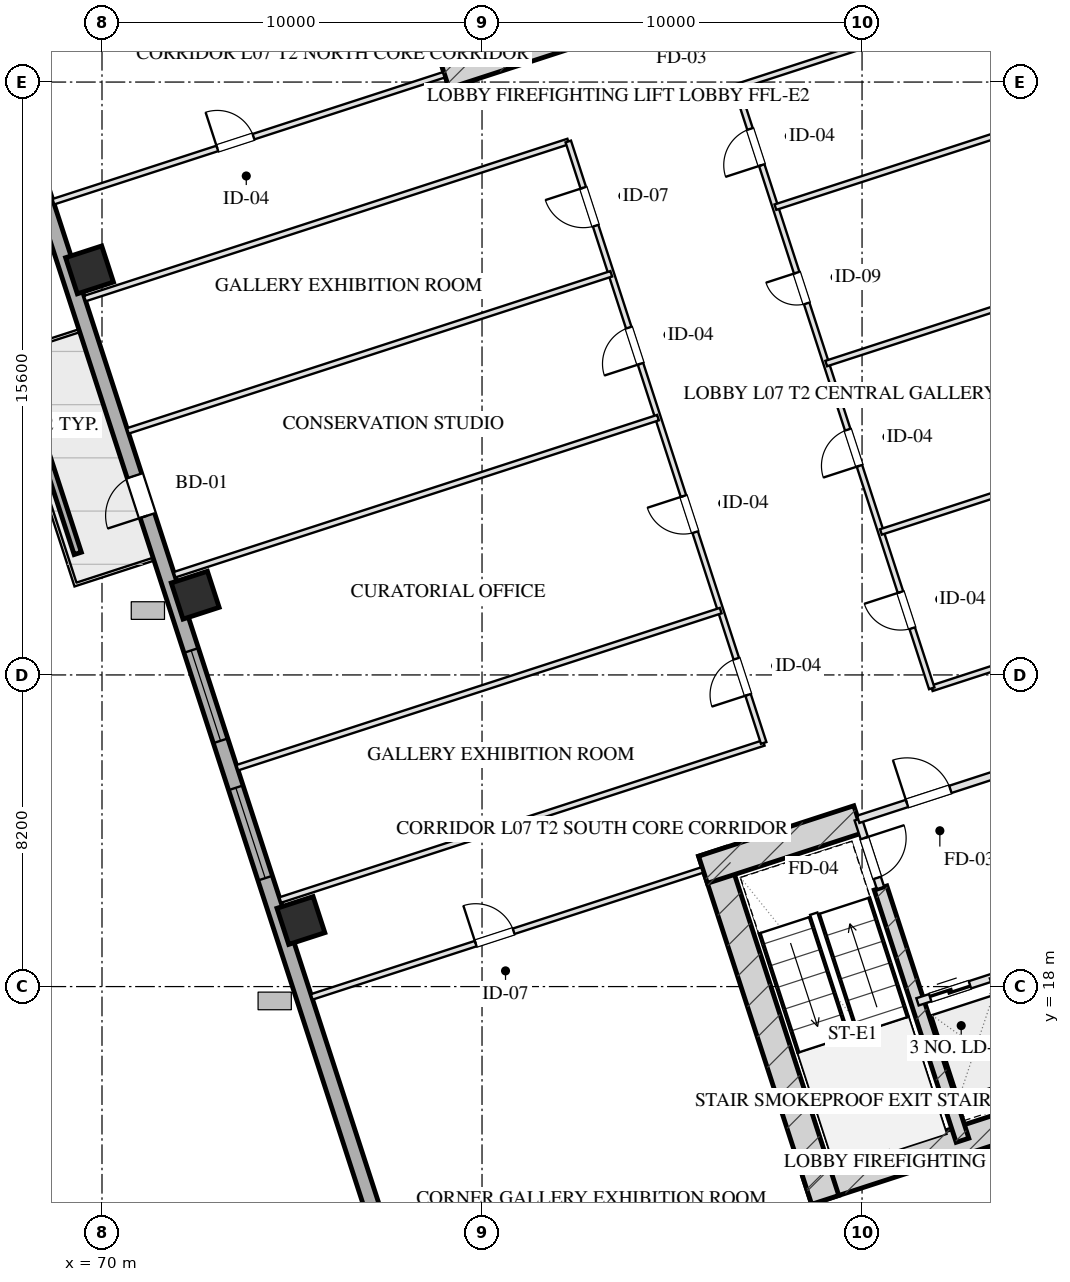
"""IFC4 building model, lengths in metres.
Left out: names, types, materials, properties, quantities, classifications, styles, units other than length and angle.
Written with IfcOpenShell. Run it as: python <this file> out.ifc"""

import sys

from ifc_helpers import new_model, si_unit, direction, frame, frame_2d, origin, origin_2d, place, context, subcontext, project, spatial, rectangle, hollow_rectangle, extrude, element, fill, save


model = new_model("IFC4")
c1 = context("Model", 3, precision=1e-05, world=origin(), true_north=direction((0.0, 1.0)))
c2 = subcontext(c1, "Body", "Model", "MODEL_VIEW")
j1 = project(units=[si_unit("LENGTHUNIT", "METRE"), si_unit("PLANEANGLEUNIT", "RADIAN")], contexts=[c1])
p1 = place(None, origin())
s1 = spatial("IfcSite", under=j1, at=p1, CompositionType="ELEMENT")
p2 = place(p1, origin())
s2 = spatial("IfcBuilding", under=s1, at=p2, CompositionType="ELEMENT")
p3 = place(p2, frame((0.0, 0.0, 34.0)))
s3 = spatial("IfcBuildingStorey", under=s2, at=p3, CompositionType="ELEMENT", Elevation=34.0)
p4 = place(p3, frame((88.559, 12.629, 0.0), z_axis=(0.0, 0.0, 1.0), x_axis=(0.951056072937, 0.309018358888, 0.0)))
e1 = element("IfcWall", 1, at=p4, inside=s3, PredefinedType="SHEAR", context=c2, shape_type="SweptSolid", body=[
    extrude(rectangle(XDim=16.55, YDim=0.75, at=frame_2d((8.275, 0.0))), origin(), (0.0, 0.0, 1.0), 4.0),
])
p5 = place(p3, frame((86.055, 21.546, 0.0), z_axis=(0.0, 0.0, 1.0), x_axis=(0.309023585745, -0.951054374604, 0.0)))
e2 = element("IfcWall", 2, at=p5, inside=s3, PredefinedType="SHEAR", context=c2, shape_type="SweptSolid", body=[
    extrude(rectangle(XDim=9.63, YDim=0.75, at=frame_2d((4.815, 0.0))), origin(), (0.0, 0.0, 1.0), 4.0),
])
p6 = place(p3, frame((90.486, 20.594, 0.0), z_axis=(0.0, 0.0, 1.0), x_axis=(0.309020428229, -0.951055400562, 0.0)))
e3 = element("IfcWall", 3, at=p6, inside=s3, PredefinedType="SHEAR", context=c2, shape_type="SweptSolid", body=[
    extrude(rectangle(XDim=6.98, YDim=0.35, at=frame_2d((3.49, 0.0))), origin(), (0.0, 0.0, 1.0), 4.0),
])
p7 = place(p3, frame((85.814, 21.074, 0.0), z_axis=(0.0, 0.0, 1.0), x_axis=(0.95106580992, 0.308988390074, 0.0)))
e4 = element("IfcWall", 4, at=p7, inside=s3, PredefinedType="SHEAR", context=c2, shape_type="SweptSolid", body=[
    extrude(rectangle(XDim=4.295, YDim=0.75, at=frame_2d((2.147, 0.0))), origin(), (0.0, 0.0, 1.0), 4.0),
])
p8 = place(p3, frame((79.489, 41.756, 0.0), z_axis=(0.0, 0.0, 1.0), x_axis=(-0.309016134813, 0.951056795583, 0.0)))
e5 = element("IfcWall", 5, at=p8, inside=s3, PredefinedType="SHEAR", context=c2, shape_type="SweptSolid", body=[
    extrude(rectangle(XDim=9.63, YDim=0.75, at=frame_2d((4.815, 0.0))), origin(), (0.0, 0.0, 1.0), 4.0),
])
p9 = place(p3, frame((79.016, 41.997, 0.0), z_axis=(0.0, 0.0, 1.0), x_axis=(0.95106038264, 0.309005094736, 0.0)))
e6 = element("IfcWall", 6, at=p9, inside=s3, PredefinedType="SHEAR", context=c2, shape_type="SweptSolid", body=[
    extrude(rectangle(XDim=4.295, YDim=0.75, at=frame_2d((2.147, 0.0))), origin(), (0.0, 0.0, 1.0), 4.0),
])
for number, where, z_axis, x_axis in (
    (7, (75.234, 19.739, 0.0), (0.0, 0.0, 1.0), (0.951, 0.309, 0.0)),
    (8, (72.453, 28.299, 0.0), (0.0, 0.0, 1.0), (0.951, 0.309, 0.0)),
    (9, (69.672, 36.858, 0.0), (0.0, 0.0, 1.0), (0.951, 0.309, 0.0)),
):
    element("IfcColumn", number, at=place(p3, frame(where, z_axis=z_axis, x_axis=x_axis)), inside=s3, PredefinedType="COLUMN", context=c2, shape_type="SweptSolid", body=[
        extrude(hollow_rectangle(XDim=1.0, YDim=1.0, WallThickness=0.036, at=origin_2d()), origin(), (0.0, 0.0, 1.0), 4.001),
    ])
p10 = place(p3, frame((79.655, 4.352, 0.0), z_axis=(0.0, 0.0, 1.0), x_axis=(-0.309014526607, 0.951057318118, 0.0)))
e10 = element("IfcWall", 10, at=p10, inside=s3, PredefinedType="SOLIDWALL", context=c2, shape_type="SweptSolid", body=[
    extrude(rectangle(XDim=50.0, YDim=0.4, at=frame_2d((25.0, 0.0))), origin(), (0.0, 0.0, 1.0), 3.16),
])
p11 = place(p10, frame((17.35, 0.0, 0.75)))
e11 = element("IfcOpeningElement", 11, at=p11, cuts=e10, PredefinedType="OPENING", context=c2, shape_type="SweptSolid", body=[
    extrude(rectangle(XDim=2.5, YDim=1.75, at=frame_2d((1.25, 0.875))), frame((0.0, 0.21, 0.0), z_axis=(0.0, -1.0, 0.0), x_axis=(1.0, 0.0, 0.0)), (0.0, 0.0, 1.0), 0.42),
])
p12 = place(p10, frame((21.15, 0.0, 0.75)))
e12 = element("IfcOpeningElement", 12, at=p12, cuts=e10, PredefinedType="OPENING", context=c2, shape_type="SweptSolid", body=[
    extrude(rectangle(XDim=2.5, YDim=1.75, at=frame_2d((1.25, 0.875))), frame((0.0, 0.21, 0.0), z_axis=(0.0, -1.0, 0.0), x_axis=(1.0, 0.0, 0.0)), (0.0, 0.0, 1.0), 0.42),
])
p13 = place(p10, frame((27.38, 0.0, 0.0)))
e13 = element("IfcOpeningElement", 13, at=p13, cuts=e10, PredefinedType="OPENING", context=c2, shape_type="SweptSolid", body=[
    extrude(rectangle(XDim=1.1, YDim=2.15, at=frame_2d((0.55, 1.075))), frame((0.0, 0.21, 0.0), z_axis=(0.0, -1.0, 0.0), x_axis=(1.0, 0.0, 0.0)), (0.0, 0.0, 1.0), 0.42),
])
p14 = place(p3, frame((113.998, 12.567, 0.0), z_axis=(0.0, 0.0, 1.0), x_axis=(-0.951055939317, -0.309018770125, 0.0)))
e14 = element("IfcWall", 14, at=p14, inside=s3, PredefinedType="SOLIDWALL", context=c2, shape_type="SweptSolid", body=[
    extrude(rectangle(XDim=32.4, YDim=0.4, at=frame_2d((16.2, 0.0))), origin(), (0.0, 0.0, 1.0), 3.16),
])
p15 = place(p3, frame((69.362, 29.397, 0.0), z_axis=(0.0, 0.0, 1.0), x_axis=(-0.309032019345, 0.951051634255, 0.0)))
e15 = element("IfcWall", 15, at=p15, inside=s3, PredefinedType="PARAPET", context=c2, shape_type="SweptSolid", body=[
    extrude(rectangle(XDim=4.8, YDim=0.2, at=frame_2d((2.4, 0.0))), origin(), (0.0, 0.0, 1.0), 0.75),
])
p16 = place(p3, frame((89.899, 22.401, 0.0), z_axis=(0.0, 0.0, 1.0), x_axis=(0.308932062672, -0.951084108086, 0.0)))
e16 = element("IfcWall", 16, at=p16, inside=s3, PredefinedType="PARTITIONING", context=c2, shape_type="SweptSolid", body=[
    extrude(rectangle(XDim=1.9, YDim=0.2, at=frame_2d((0.95, 0.0))), origin(), (0.0, 0.0, 1.0), 3.725),
])
p17 = place(p16, frame((0.52, 0.0, 0.0)))
e17 = element("IfcOpeningElement", 17, at=p17, cuts=e16, PredefinedType="OPENING", context=c2, shape_type="SweptSolid", body=[
    extrude(rectangle(XDim=1.1, YDim=2.05, at=frame_2d((0.55, 1.025))), frame((0.0, 0.11, 0.0), z_axis=(0.0, -1.0, 0.0), x_axis=(1.0, 0.0, 0.0)), (0.0, 0.0, 1.0), 0.22),
])
p18 = place(p3, frame((89.899, 22.401, 0.0), z_axis=(0.0, 0.0, 1.0), x_axis=(0.951046716504, 0.309047153403, 0.0)))
e18 = element("IfcWall", 18, at=p18, inside=s3, PredefinedType="PARTITIONING", context=c2, shape_type="SweptSolid", body=[
    extrude(rectangle(XDim=3.83, YDim=0.2, at=frame_2d((1.915, 0.0))), origin(), (0.0, 0.0, 1.0), 3.725),
])
p19 = place(p18, frame((1.35, 0.0, 0.0)))
e19 = element("IfcOpeningElement", 19, at=p19, cuts=e18, PredefinedType="OPENING", context=c2, shape_type="SweptSolid", body=[
    extrude(rectangle(XDim=1.2, YDim=2.05, at=frame_2d((0.6, 1.025))), frame((0.0, 0.11, 0.0), z_axis=(0.0, -1.0, 0.0), x_axis=(1.0, 0.0, 0.0)), (0.0, 0.0, 1.0), 0.22),
])
p20 = place(p3, frame((91.46, 17.598, 0.0), z_axis=(0.0, 0.0, 1.0), x_axis=(0.951062257173, 0.308999325213, 0.0)))
e20 = element("IfcWall", 20, at=p20, inside=s3, PredefinedType="PARTITIONING", context=c2, shape_type="SweptSolid", body=[
    extrude(rectangle(XDim=2.1, YDim=0.2, at=frame_2d((1.05, 0.0))), origin(), (0.0, 0.0, 1.0), 3.725),
])
p21 = place(p20, frame((0.35, 0.0, 0.0)))
e21 = element("IfcOpeningElement", 21, at=p21, cuts=e20, PredefinedType="OPENING", context=c2, shape_type="SweptSolid", body=[
    extrude(rectangle(XDim=1.1, YDim=2.05, at=frame_2d((0.55, 1.025))), frame((0.0, 0.11, 0.0), z_axis=(0.0, -1.0, 0.0), x_axis=(1.0, 0.0, 0.0)), (0.0, 0.0, 1.0), 0.22),
])
p22 = place(p3, frame((93.457, 18.247, 0.0), z_axis=(0.0, 0.0, 1.0), x_axis=(0.3089935693, -0.951064127245, 0.0)))
e22 = element("IfcWall", 22, at=p22, inside=s3, PredefinedType="PARTITIONING", context=c2, shape_type="SweptSolid", body=[
    extrude(rectangle(XDim=3.7, YDim=0.2, at=frame_2d((1.85, 0.0))), origin(), (0.0, 0.0, 1.0), 3.725),
])
p23 = place(p3, frame((75.519, 17.729, 0.0), z_axis=(0.0, 0.0, 1.0), x_axis=(0.951056658866, 0.309016555588, 0.0)))
e23 = element("IfcWall", 23, at=p23, inside=s3, PredefinedType="PARTITIONING", context=c2, shape_type="SweptSolid", body=[
    extrude(rectangle(XDim=10.8, YDim=0.15, at=frame_2d((5.4, 0.0))), origin(), (0.0, 0.0, 1.0), 3.725),
])
p24 = place(p23, frame((4.536, 0.0, 0.0)))
e24 = element("IfcOpeningElement", 24, at=p24, cuts=e23, PredefinedType="OPENING", context=c2, shape_type="SweptSolid", body=[
    extrude(rectangle(XDim=1.05, YDim=2.05, at=frame_2d((0.525, 1.025))), frame((0.0, 0.085, 0.0), z_axis=(0.0, -1.0, 0.0), x_axis=(1.0, 0.0, 0.0)), (0.0, 0.0, 1.0), 0.17),
])
p25 = place(p3, frame((68.721, 38.652, 0.0), z_axis=(0.0, 0.0, 1.0), x_axis=(0.951056658866, 0.309016555588, 0.0)))
e25 = element("IfcWall", 25, at=p25, inside=s3, PredefinedType="PARTITIONING", context=c2, shape_type="SweptSolid", body=[
    extrude(rectangle(XDim=10.8, YDim=0.15, at=frame_2d((5.4, 0.0))), origin(), (0.0, 0.0, 1.0), 3.725),
])
p26 = place(p25, frame((4.536, 0.0, 0.0)))
e26 = element("IfcOpeningElement", 26, at=p26, cuts=e25, PredefinedType="OPENING", context=c2, shape_type="SweptSolid", body=[
    extrude(rectangle(XDim=1.0, YDim=2.05, at=frame_2d((0.5, 1.025))), frame((0.0, 0.085, 0.0), z_axis=(0.0, -1.0, 0.0), x_axis=(1.0, 0.0, 0.0)), (0.0, 0.0, 1.0), 0.17),
])
p27 = place(p3, frame((74.691, 20.278, 0.0), z_axis=(0.0, 0.0, 1.0), x_axis=(0.951052712421, 0.309028701251, 0.0)))
e27 = element("IfcWall", 27, at=p27, inside=s3, PredefinedType="PARTITIONING", context=c2, shape_type="SweptSolid", body=[
    extrude(rectangle(XDim=13.375, YDim=0.15, at=frame_2d((6.688, 0.0))), origin(), (0.0, 0.0, 1.0), 3.725),
])
p28 = place(p3, frame((91.834, 25.848, 0.0), z_axis=(0.0, 0.0, 1.0), x_axis=(0.951055605195, 0.309019798438, 0.0)))
e28 = element("IfcWall", 28, at=p28, inside=s3, PredefinedType="PARTITIONING", context=c2, shape_type="SweptSolid", body=[
    extrude(rectangle(XDim=19.575, YDim=0.15, at=frame_2d((9.788, 0.0))), origin(), (0.0, 0.0, 1.0), 3.725),
])
p29 = place(p3, frame((69.549, 36.103, 0.0), z_axis=(0.0, 0.0, 1.0), x_axis=(0.951058077006, 0.309012190961, 0.0)))
e29 = element("IfcWall", 29, at=p29, inside=s3, PredefinedType="PARTITIONING", context=c2, shape_type="SweptSolid", body=[
    extrude(rectangle(XDim=13.375, YDim=0.15, at=frame_2d((6.688, 0.0))), origin(), (0.0, 0.0, 1.0), 3.725),
])
p30 = place(p3, frame((86.692, 41.673, 0.0), z_axis=(0.0, 0.0, 1.0), x_axis=(0.951055605195, 0.309019798438, 0.0)))
e30 = element("IfcWall", 30, at=p30, inside=s3, PredefinedType="PARTITIONING", context=c2, shape_type="SweptSolid", body=[
    extrude(rectangle(XDim=19.575, YDim=0.15, at=frame_2d((9.788, 0.0))), origin(), (0.0, 0.0, 1.0), 3.725),
])
p31 = place(p3, frame((87.412, 24.411, 0.0), z_axis=(0.0, 0.0, 1.0), x_axis=(-0.309022042254, 0.951054876125, 0.0)))
e31 = element("IfcWall", 31, at=p31, inside=s3, PredefinedType="PARTITIONING", context=c2, shape_type="SweptSolid", body=[
    extrude(rectangle(XDim=16.64, YDim=0.15, at=frame_2d((8.32, 0.0))), origin(), (0.0, 0.0, 1.0), 3.725),
])
p32 = place(p31, frame((1.33, 0.0, 0.0)))
e32 = element("IfcOpeningElement", 32, at=p32, cuts=e31, PredefinedType="OPENING", context=c2, shape_type="SweptSolid", body=[
    extrude(rectangle(XDim=1.0, YDim=2.05, at=frame_2d((0.5, 1.025))), frame((0.0, 0.085, 0.0), z_axis=(0.0, -1.0, 0.0), x_axis=(1.0, 0.0, 0.0)), (0.0, 0.0, 1.0), 0.17),
])
p33 = place(p31, frame((5.83, 0.0, 0.0)))
e33 = element("IfcOpeningElement", 33, at=p33, cuts=e31, PredefinedType="OPENING", context=c2, shape_type="SweptSolid", body=[
    extrude(rectangle(XDim=1.0, YDim=2.05, at=frame_2d((0.5, 1.025))), frame((0.0, 0.085, 0.0), z_axis=(0.0, -1.0, 0.0), x_axis=(1.0, 0.0, 0.0)), (0.0, 0.0, 1.0), 0.17),
])
p34 = place(p31, frame((10.49, 0.0, 0.0)))
e34 = element("IfcOpeningElement", 34, at=p34, cuts=e31, PredefinedType="OPENING", context=c2, shape_type="SweptSolid", body=[
    extrude(rectangle(XDim=1.0, YDim=2.05, at=frame_2d((0.5, 1.025))), frame((0.0, 0.085, 0.0), z_axis=(0.0, -1.0, 0.0), x_axis=(1.0, 0.0, 0.0)), (0.0, 0.0, 1.0), 0.17),
])
p35 = place(p31, frame((14.31, 0.0, 0.0)))
e35 = element("IfcOpeningElement", 35, at=p35, cuts=e31, PredefinedType="OPENING", context=c2, shape_type="SweptSolid", body=[
    extrude(rectangle(XDim=1.05, YDim=2.05, at=frame_2d((0.525, 1.025))), frame((0.0, 0.085, 0.0), z_axis=(0.0, -1.0, 0.0), x_axis=(1.0, 0.0, 0.0)), (0.0, 0.0, 1.0), 0.17),
])
p36 = place(p3, frame((91.834, 25.848, 0.0), z_axis=(0.0, 0.0, 1.0), x_axis=(-0.30901773025, 0.951056277195, 0.0)))
e36 = element("IfcWall", 36, at=p36, inside=s3, PredefinedType="PARTITIONING", context=c2, shape_type="SweptSolid", body=[
    extrude(rectangle(XDim=16.64, YDim=0.15, at=frame_2d((8.32, 0.0))), origin(), (0.0, 0.0, 1.0), 3.725),
])
p37 = place(p36, frame((1.663, 0.0, 0.0)))
e37 = element("IfcOpeningElement", 37, at=p37, cuts=e36, PredefinedType="OPENING", context=c2, shape_type="SweptSolid", body=[
    extrude(rectangle(XDim=1.0, YDim=2.05, at=frame_2d((0.5, 1.025))), frame((0.0, 0.085, 0.0), z_axis=(0.0, -1.0, 0.0), x_axis=(1.0, 0.0, 0.0)), (0.0, 0.0, 1.0), 0.17),
])
p38 = place(p36, frame((6.156, 0.0, 0.0)))
e38 = element("IfcOpeningElement", 38, at=p38, cuts=e36, PredefinedType="OPENING", context=c2, shape_type="SweptSolid", body=[
    extrude(rectangle(XDim=1.0, YDim=2.05, at=frame_2d((0.5, 1.025))), frame((0.0, 0.085, 0.0), z_axis=(0.0, -1.0, 0.0), x_axis=(1.0, 0.0, 0.0)), (0.0, 0.0, 1.0), 0.17),
])
p39 = place(p36, frame((10.649, 0.0, 0.0)))
e39 = element("IfcOpeningElement", 39, at=p39, cuts=e36, PredefinedType="OPENING", context=c2, shape_type="SweptSolid", body=[
    extrude(rectangle(XDim=0.85, YDim=2.05, at=frame_2d((0.425, 1.025))), frame((0.0, 0.085, 0.0), z_axis=(0.0, -1.0, 0.0), x_axis=(1.0, 0.0, 0.0)), (0.0, 0.0, 1.0), 0.17),
])
p40 = place(p36, frame((14.476, 0.0, 0.0)))
e40 = element("IfcOpeningElement", 40, at=p40, cuts=e36, PredefinedType="OPENING", context=c2, shape_type="SweptSolid", body=[
    extrude(rectangle(XDim=1.0, YDim=2.05, at=frame_2d((0.5, 1.025))), frame((0.0, 0.085, 0.0), z_axis=(0.0, -1.0, 0.0), x_axis=(1.0, 0.0, 0.0)), (0.0, 0.0, 1.0), 0.17),
])
for number, where, z_axis, x_axis in (
    (41, (73.56, 23.759, 0.0), (0.0, 0.0, 1.0), (0.951, 0.309, 0.0)),
    (42, (71.91, 28.837, 0.0), (0.0, 0.0, 1.0), (0.951, 0.309, 0.0)),
):
    element("IfcWall", number, at=place(p3, frame(where, z_axis=z_axis, x_axis=x_axis)), inside=s3, PredefinedType="PARTITIONING", context=c2, shape_type="SweptSolid", body=[
        extrude(rectangle(XDim=13.375, YDim=0.15, at=frame_2d((6.688, 0.0))), origin(), (0.0, 0.0, 1.0), 3.725),
    ])
p41 = place(p3, frame((70.68, 32.622, 0.0), z_axis=(0.0, 0.0, 1.0), x_axis=(0.951056333968, 0.309017555521, 0.0)))
e43 = element("IfcWall", 43, at=p41, inside=s3, PredefinedType="PARTITIONING", context=c2, shape_type="SweptSolid", body=[
    extrude(rectangle(XDim=13.375, YDim=0.15, at=frame_2d((6.688, 0.0))), origin(), (0.0, 0.0, 1.0), 3.725),
])
for number, where, z_axis, x_axis in (
    (44, (90.497, 29.962, 0.0), (0.0, 0.0, 1.0), (0.951, 0.309, 0.0)),
    (45, (89.057, 34.394, 0.0), (0.0, 0.0, 1.0), (0.951, 0.309, 0.0)),
    (46, (87.72, 38.508, 0.0), (0.0, 0.0, 1.0), (0.951, 0.309, 0.0)),
):
    element("IfcWall", number, at=place(p3, frame(where, z_axis=z_axis, x_axis=x_axis)), inside=s3, PredefinedType="PARTITIONING", context=c2, shape_type="SweptSolid", body=[
        extrude(rectangle(XDim=19.575, YDim=0.15, at=frame_2d((9.788, 0.0))), origin(), (0.0, 0.0, 1.0), 3.725),
    ])
p42 = place(p11, origin())
e47 = element("IfcWindow", 47, at=p42, inside=s3, PartitioningType="TRIPLE_PANEL_VERTICAL", PredefinedType="WINDOW", context=c2, shape_type="SweptSolid", body=[
    extrude(rectangle(XDim=2.5, YDim=1.75, at=frame_2d((1.25, 0.875))), frame((0.0, 0.03, 0.0), z_axis=(0.0, -1.0, 0.0), x_axis=(1.0, 0.0, 0.0)), (0.0, 0.0, 1.0), 0.06),
])
fill(e11, e47)
p43 = place(p12, origin())
e48 = element("IfcWindow", 48, at=p43, inside=s3, PartitioningType="TRIPLE_PANEL_VERTICAL", PredefinedType="WINDOW", context=c2, shape_type="SweptSolid", body=[
    extrude(rectangle(XDim=2.5, YDim=1.75, at=frame_2d((1.25, 0.875))), frame((0.0, 0.03, 0.0), z_axis=(0.0, -1.0, 0.0), x_axis=(1.0, 0.0, 0.0)), (0.0, 0.0, 1.0), 0.06),
])
fill(e12, e48)
p44 = place(p13, origin())
e49 = element("IfcDoor", 49, at=p44, inside=s3, OperationType="SINGLE_SWING_LEFT", PredefinedType="DOOR", context=c2, shape_type="SweptSolid", body=[
    extrude(rectangle(XDim=1.1, YDim=2.15, at=frame_2d((0.55, 1.075))), frame((0.0, 0.025, 0.0), z_axis=(0.0, -1.0, 0.0), x_axis=(1.0, 0.0, 0.0)), (0.0, 0.0, 1.0), 0.05),
])
fill(e13, e49)
p45 = place(p17, origin())
e50 = element("IfcDoor", 50, at=p45, inside=s3, OperationType="SINGLE_SWING_LEFT", PredefinedType="DOOR", context=c2, shape_type="SweptSolid", body=[
    extrude(rectangle(XDim=1.1, YDim=2.05, at=frame_2d((0.55, 1.025))), frame((0.0, 0.025, 0.0), z_axis=(0.0, -1.0, 0.0), x_axis=(1.0, 0.0, 0.0)), (0.0, 0.0, 1.0), 0.05),
])
fill(e17, e50)
p46 = place(p19, origin())
e51 = element("IfcDoor", 51, at=p46, inside=s3, OperationType="SINGLE_SWING_LEFT", PredefinedType="DOOR", context=c2, shape_type="SweptSolid", body=[
    extrude(rectangle(XDim=1.2, YDim=2.05, at=frame_2d((0.6, 1.025))), frame((0.0, 0.025, 0.0), z_axis=(0.0, -1.0, 0.0), x_axis=(1.0, 0.0, 0.0)), (0.0, 0.0, 1.0), 0.05),
])
fill(e19, e51)
p47 = place(p21, origin())
e52 = element("IfcDoor", 52, at=p47, inside=s3, OperationType="DOUBLE_DOOR_SLIDING", PredefinedType="DOOR", context=c2, shape_type="SweptSolid", body=[
    extrude(rectangle(XDim=1.1, YDim=2.05, at=frame_2d((0.55, 1.025))), frame((0.0, 0.025, 0.0), z_axis=(0.0, -1.0, 0.0), x_axis=(1.0, 0.0, 0.0)), (0.0, 0.0, 1.0), 0.05),
])
fill(e21, e52)
p48 = place(p24, origin())
e53 = element("IfcDoor", 53, at=p48, inside=s3, OperationType="SINGLE_SWING_LEFT", PredefinedType="DOOR", context=c2, shape_type="SweptSolid", body=[
    extrude(rectangle(XDim=1.05, YDim=2.05, at=frame_2d((0.525, 1.025))), frame((0.0, 0.025, 0.0), z_axis=(0.0, -1.0, 0.0), x_axis=(1.0, 0.0, 0.0)), (0.0, 0.0, 1.0), 0.05),
])
fill(e24, e53)
p49 = place(p26, origin())
e54 = element("IfcDoor", 54, at=p49, inside=s3, OperationType="SINGLE_SWING_LEFT", PredefinedType="DOOR", context=c2, shape_type="SweptSolid", body=[
    extrude(rectangle(XDim=1.0, YDim=2.05, at=frame_2d((0.5, 1.025))), frame((0.0, 0.025, 0.0), z_axis=(0.0, -1.0, 0.0), x_axis=(1.0, 0.0, 0.0)), (0.0, 0.0, 1.0), 0.05),
])
fill(e26, e54)
p50 = place(p32, origin())
e55 = element("IfcDoor", 55, at=p50, inside=s3, OperationType="SINGLE_SWING_LEFT", PredefinedType="DOOR", context=c2, shape_type="SweptSolid", body=[
    extrude(rectangle(XDim=1.0, YDim=2.05, at=frame_2d((0.5, 1.025))), frame((0.0, 0.025, 0.0), z_axis=(0.0, -1.0, 0.0), x_axis=(1.0, 0.0, 0.0)), (0.0, 0.0, 1.0), 0.05),
])
fill(e32, e55)
p51 = place(p33, origin())
e56 = element("IfcDoor", 56, at=p51, inside=s3, OperationType="SINGLE_SWING_RIGHT", PredefinedType="DOOR", context=c2, shape_type="SweptSolid", body=[
    extrude(rectangle(XDim=1.0, YDim=2.05, at=frame_2d((0.5, 1.025))), frame((0.0, 0.025, 0.0), z_axis=(0.0, -1.0, 0.0), x_axis=(1.0, 0.0, 0.0)), (0.0, 0.0, 1.0), 0.05),
])
fill(e33, e56)
p52 = place(p34, origin())
e57 = element("IfcDoor", 57, at=p52, inside=s3, OperationType="SINGLE_SWING_LEFT", PredefinedType="DOOR", context=c2, shape_type="SweptSolid", body=[
    extrude(rectangle(XDim=1.0, YDim=2.05, at=frame_2d((0.5, 1.025))), frame((0.0, 0.025, 0.0), z_axis=(0.0, -1.0, 0.0), x_axis=(1.0, 0.0, 0.0)), (0.0, 0.0, 1.0), 0.05),
])
fill(e34, e57)
p53 = place(p35, origin())
e58 = element("IfcDoor", 58, at=p53, inside=s3, OperationType="SINGLE_SWING_RIGHT", PredefinedType="DOOR", context=c2, shape_type="SweptSolid", body=[
    extrude(rectangle(XDim=1.05, YDim=2.05, at=frame_2d((0.525, 1.025))), frame((0.0, 0.025, 0.0), z_axis=(0.0, -1.0, 0.0), x_axis=(1.0, 0.0, 0.0)), (0.0, 0.0, 1.0), 0.05),
])
fill(e35, e58)
p54 = place(p37, origin())
e59 = element("IfcDoor", 59, at=p54, inside=s3, OperationType="SINGLE_SWING_RIGHT", PredefinedType="DOOR", context=c2, shape_type="SweptSolid", body=[
    extrude(rectangle(XDim=1.0, YDim=2.05, at=frame_2d((0.5, 1.025))), frame((0.0, 0.025, 0.0), z_axis=(0.0, -1.0, 0.0), x_axis=(1.0, 0.0, 0.0)), (0.0, 0.0, 1.0), 0.05),
])
fill(e37, e59)
p55 = place(p38, origin())
e60 = element("IfcDoor", 60, at=p55, inside=s3, OperationType="SINGLE_SWING_LEFT", PredefinedType="DOOR", context=c2, shape_type="SweptSolid", body=[
    extrude(rectangle(XDim=1.0, YDim=2.05, at=frame_2d((0.5, 1.025))), frame((0.0, 0.025, 0.0), z_axis=(0.0, -1.0, 0.0), x_axis=(1.0, 0.0, 0.0)), (0.0, 0.0, 1.0), 0.05),
])
fill(e38, e60)
p56 = place(p39, origin())
e61 = element("IfcDoor", 61, at=p56, inside=s3, OperationType="SINGLE_SWING_RIGHT", PredefinedType="DOOR", context=c2, shape_type="SweptSolid", body=[
    extrude(rectangle(XDim=0.85, YDim=2.05, at=frame_2d((0.425, 1.025))), frame((0.0, 0.025, 0.0), z_axis=(0.0, -1.0, 0.0), x_axis=(1.0, 0.0, 0.0)), (0.0, 0.0, 1.0), 0.05),
])
fill(e39, e61)
p57 = place(p40, origin())
e62 = element("IfcDoor", 62, at=p57, inside=s3, OperationType="SINGLE_SWING_LEFT", PredefinedType="DOOR", context=c2, shape_type="SweptSolid", body=[
    extrude(rectangle(XDim=1.0, YDim=2.05, at=frame_2d((0.5, 1.025))), frame((0.0, 0.025, 0.0), z_axis=(0.0, -1.0, 0.0), x_axis=(1.0, 0.0, 0.0)), (0.0, 0.0, 1.0), 0.05),
])
fill(e40, e62)
save(model, sys.argv[1])
